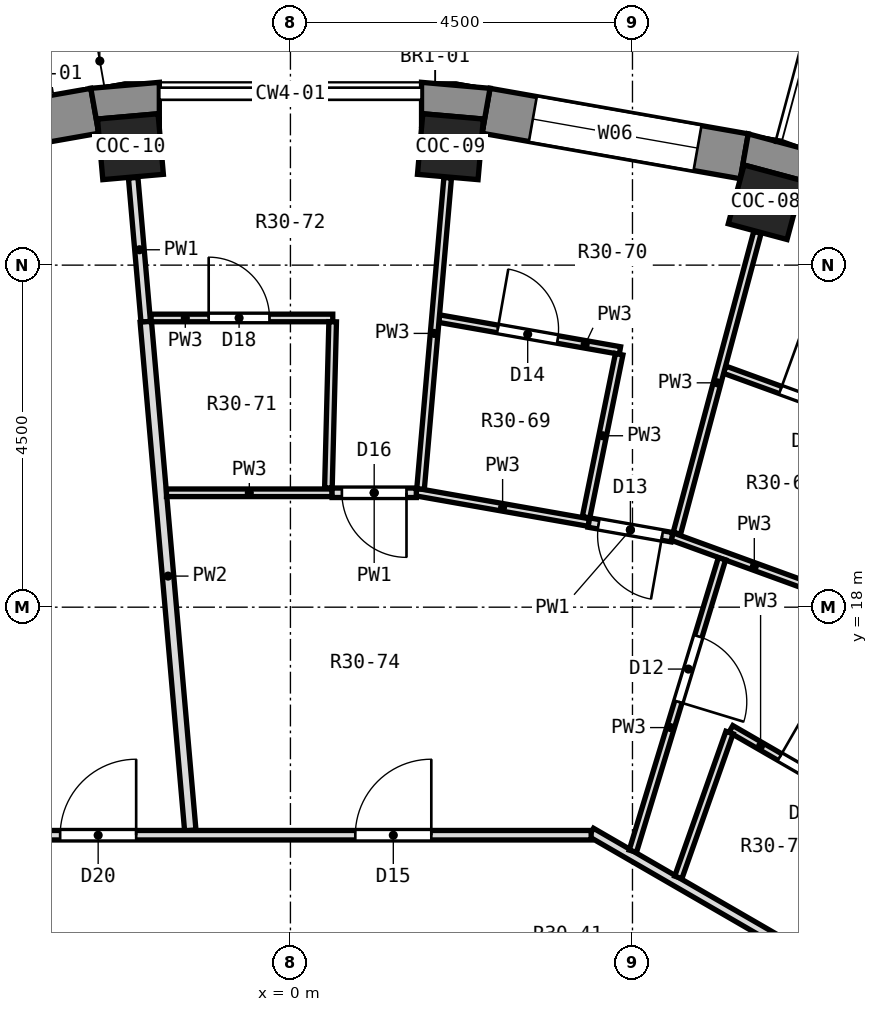
"""IFC4 building model, lengths in metres.
Left out: names, types, materials, properties, quantities, classifications, styles, units other than length and angle.
Written with IfcOpenShell. Run it as: python <this file> out.ifc"""

import sys

from ifc_helpers import new_model, si_unit, direction, frame, frame_2d, origin, origin_2d, place, context, subcontext, project, spatial, polyline, rectangle, outline, extrude, element, fill, save


model = new_model("IFC4")
c1 = context("Model", 3, precision=1e-05, world=origin(), true_north=direction((0.0, 1.0)))
c2 = subcontext(c1, "Body", "Model", "MODEL_VIEW")
j1 = project(units=[si_unit("LENGTHUNIT", "METRE"), si_unit("PLANEANGLEUNIT", "RADIAN")], contexts=[c1])
p1 = place(None, origin())
s1 = spatial("IfcSite", under=j1, at=p1, CompositionType="ELEMENT")
p2 = place(p1, origin())
s2 = spatial("IfcBuilding", under=s1, at=p2, CompositionType="ELEMENT")
p3 = place(p2, frame((0.0, 0.0, 210.3)))
s3 = spatial("IfcBuildingStorey", under=s2, at=p3, CompositionType="ELEMENT", Elevation=210.3)
for number, where, z_axis, x_axis in (
    (1, (6.25, 23.327, 0.0), (0.0, 0.0, 1.0), (0.259, 0.966, 0.0)),
    (2, (2.105, 24.058, 0.0), (0.0, 0.0, 1.0), (0.087, 0.996, 0.0)),
    (3, (-2.105, 24.058, 0.0), (0.0, 0.0, 1.0), (-0.087, 0.996, 0.0)),
):
    element("IfcColumn", number, at=place(p3, frame(where, z_axis=z_axis, x_axis=x_axis)), inside=s3, PredefinedType="COLUMN", context=c2, shape_type="SweptSolid", body=[
        extrude(rectangle(XDim=0.8, YDim=0.8, at=origin_2d()), origin(), (0.0, 0.0, 1.0), 3.3),
    ])
p4 = place(p3, frame((10.036, 22.531, 0.0), z_axis=(0.0, 0.0, 1.0), x_axis=(-0.93968799822, 0.342032843455, 0.0)))
e4 = element("IfcWall", 4, at=p4, inside=s3, PredefinedType="SOLIDWALL", context=c2, shape_type="SweptSolid", body=[
    extrude(rectangle(XDim=3.45, YDim=0.6, at=frame_2d((1.725, 0.0))), origin(), (0.0, 0.0, 1.0), 2.85),
])
p5 = place(p4, frame((0.625, 0.0, 0.9)))
e5 = element("IfcOpeningElement", 5, at=p5, cuts=e4, PredefinedType="OPENING", context=c2, shape_type="SweptSolid", body=[
    extrude(rectangle(XDim=2.2, YDim=1.8, at=frame_2d((1.1, 0.9))), frame((0.0, 0.312, 0.0), z_axis=(0.0, -1.0, 0.0), x_axis=(1.0, 0.0, 0.0)), (0.0, 0.0, 1.0), 0.624),
])
p6 = place(p3, frame((5.971, 23.932, 0.0), z_axis=(0.0, 0.0, 1.0), x_axis=(-0.984814892183, 0.173607684551, 0.0)))
e6 = element("IfcWall", 6, at=p6, inside=s3, PredefinedType="SOLIDWALL", context=c2, shape_type="SweptSolid", body=[
    extrude(rectangle(XDim=3.45, YDim=0.6, at=frame_2d((1.725, 0.0))), origin(), (0.0, 0.0, 1.0), 2.85),
])
p7 = place(p6, frame((0.625, 0.0, 0.9)))
e7 = element("IfcOpeningElement", 7, at=p7, cuts=e6, PredefinedType="OPENING", context=c2, shape_type="SweptSolid", body=[
    extrude(rectangle(XDim=2.2, YDim=1.8, at=frame_2d((1.1, 0.9))), frame((0.0, 0.312, 0.0), z_axis=(0.0, -1.0, 0.0), x_axis=(1.0, 0.0, 0.0)), (0.0, 0.0, 1.0), 0.624),
])
p8 = place(p3, frame((-2.574, 24.531, 0.0), z_axis=(0.0, 0.0, 1.0), x_axis=(-0.984814892183, -0.173607684551, 0.0)))
e8 = element("IfcWall", 8, at=p8, inside=s3, PredefinedType="SOLIDWALL", context=c2, shape_type="SweptSolid", body=[
    extrude(rectangle(XDim=3.45, YDim=0.6, at=frame_2d((1.725, 0.0))), origin(), (0.0, 0.0, 1.0), 2.85),
])
p9 = place(p8, frame((0.925, 0.0, 0.0)))
e9 = element("IfcOpeningElement", 9, at=p9, cuts=e8, PredefinedType="OPENING", context=c2, shape_type="SweptSolid", body=[
    extrude(rectangle(XDim=1.6, YDim=2.4, at=frame_2d((0.8, 1.2))), frame((0.0, 0.312, 0.0), z_axis=(0.0, -1.0, 0.0), x_axis=(1.0, 0.0, 0.0)), (0.0, 0.0, 1.0), 0.624),
])
p10 = place(p3, origin())
e10 = element("IfcWall", 10, at=p10, inside=s3, PredefinedType="SOLIDWALL", context=c2, shape_type="SweptSolid", body=[
    extrude(outline(polyline([(6.023, 24.227), (5.919, 23.636), (5.968, 23.817), (6.74, 23.61), (6.692, 23.429), (6.897, 23.993), (6.023, 24.227)])), origin(), (0.0, 0.0, 1.0), 2.85),
])
p11 = place(p3, origin())
e11 = element("IfcWall", 11, at=p11, inside=s3, PredefinedType="SOLIDWALL", context=c2, shape_type="SweptSolid", body=[
    extrude(outline(polyline([(2.626, 24.826), (1.725, 24.905), (1.725, 24.305), (1.741, 24.491), (2.538, 24.422), (2.522, 24.235), (2.626, 24.826)])), origin(), (0.0, 0.0, 1.0), 2.85),
])
p12 = place(p3, origin())
e12 = element("IfcWall", 12, at=p12, inside=s3, PredefinedType="SOLIDWALL", context=c2, shape_type="SweptSolid", body=[
    extrude(outline(polyline([(-1.725, 24.905), (-2.626, 24.826), (-2.522, 24.235), (-2.538, 24.422), (-1.741, 24.491), (-1.725, 24.305), (-1.725, 24.905)])), origin(), (0.0, 0.0, 1.0), 2.85),
])
p13 = place(p3, origin())
e13 = element("IfcWall", 13, at=p13, inside=s3, PredefinedType="PARAPET", context=c2, shape_type="SweptSolid", body=[
    extrude(outline(polyline([(-2.376, 27.155), (-7.055, 26.33), (-11.52, 24.705), (-11.265, 24.159), (-6.899, 25.748), (-2.323, 26.555), (-2.376, 27.155)])), origin(), (0.0, 0.0, 1.0), 0.5),
])
p14 = place(p3, frame((-2.069, 23.65, 0.0), z_axis=(0.0, 0.0, 1.0), x_axis=(0.086912141591, -0.99621598042, 0.0)))
e14 = element("IfcWall", 14, at=p14, inside=s3, PredefinedType="PARTITIONING", context=c2, shape_type="SweptSolid", body=[
    extrude(rectangle(XDim=1.902, YDim=0.125, at=frame_2d((0.951, 0.0))), origin(), (0.0, 0.0, 1.0), 2.85),
])
p15 = place(p3, frame((-1.903, 21.755, 0.0), z_axis=(0.0, 0.0, 1.0), x_axis=(0.087173711796, -0.99619312584, 0.0)))
e15 = element("IfcWall", 15, at=p15, inside=s3, PredefinedType="PARTITIONING", context=c2, shape_type="SweptSolid", body=[
    extrude(rectangle(XDim=6.719, YDim=0.15, at=frame_2d((3.359, 0.0))), origin(), (0.0, 0.0, 1.0), 2.85),
])
p16 = place(p3, frame((3.957, 15.037, 0.0), z_axis=(0.0, 0.0, 1.0), x_axis=(0.865555702761, -0.500812664994, 0.0)))
e16 = element("IfcWall", 16, at=p16, inside=s3, PredefinedType="PARTITIONING", context=c2, shape_type="SweptSolid", body=[
    extrude(rectangle(XDim=8.049, YDim=0.125, at=frame_2d((4.024, 0.0))), origin(), (0.0, 0.0, 1.0), 2.85),
])
p17 = place(p3, frame((5.796, 16.399, 0.0), z_axis=(0.0, 0.0, 1.0), x_axis=(0.866084140742, -0.499898250802, 0.0)))
e17 = element("IfcWall", 17, at=p17, inside=s3, PredefinedType="PARTITIONING", context=c2, shape_type="SweptSolid", body=[
    extrude(rectangle(XDim=2.284, YDim=0.1, at=frame_2d((1.142, 0.0))), origin(), (0.0, 0.0, 1.0), 2.85),
])
p18 = place(p17, frame((0.741, 0.0, 0.0)))
e18 = element("IfcOpeningElement", 18, at=p18, cuts=e17, PredefinedType="OPENING", context=c2, shape_type="SweptSolid", body=[
    extrude(rectangle(XDim=0.8, YDim=2.1, at=frame_2d((0.4, 1.05))), frame((0.0, 0.062, 0.0), z_axis=(0.0, -1.0, 0.0), x_axis=(1.0, 0.0, 0.0)), (0.0, 0.0, 1.0), 0.124),
])
p19 = place(p3, frame((5.02, 18.929, 0.0), z_axis=(0.0, 0.0, 1.0), x_axis=(0.939651079277, -0.342134256123, 0.0)))
e19 = element("IfcWall", 19, at=p19, inside=s3, PredefinedType="PARTITIONING", context=c2, shape_type="SweptSolid", body=[
    extrude(rectangle(XDim=2.305, YDim=0.1, at=frame_2d((1.152, 0.0))), origin(), (0.0, 0.0, 1.0), 2.85),
])
p20 = place(p3, frame((5.712, 21.125, 0.0), z_axis=(0.0, 0.0, 1.0), x_axis=(0.939692991858, -0.342019123812, 0.0)))
e20 = element("IfcWall", 20, at=p20, inside=s3, PredefinedType="PARTITIONING", context=c2, shape_type="SweptSolid", body=[
    extrude(rectangle(XDim=2.414, YDim=0.1, at=frame_2d((1.207, 0.0))), origin(), (0.0, 0.0, 1.0), 2.85),
])
p21 = place(p20, frame((0.782, 0.0, 0.0)))
e21 = element("IfcOpeningElement", 21, at=p21, cuts=e20, PredefinedType="OPENING", context=c2, shape_type="SweptSolid", body=[
    extrude(rectangle(XDim=0.8, YDim=2.1, at=frame_2d((0.4, 1.05))), frame((0.0, 0.062, 0.0), z_axis=(0.0, -1.0, 0.0), x_axis=(1.0, 0.0, 0.0)), (0.0, 0.0, 1.0), 0.124),
])
p22 = place(p3, frame((1.656, 19.514, 0.0), z_axis=(0.0, 0.0, 1.0), x_axis=(0.984783558818, -0.173785333909, 0.0)))
e22 = element("IfcWall", 22, at=p22, inside=s3, PredefinedType="PARTITIONING", context=c2, shape_type="SweptSolid", body=[
    extrude(rectangle(XDim=2.305, YDim=0.1, at=frame_2d((1.153, 0.0))), origin(), (0.0, 0.0, 1.0), 2.85),
])
p23 = place(p3, frame((3.926, 19.113, 0.0), z_axis=(0.0, 0.0, 1.0), x_axis=(0.984810132848, -0.173634680406, 0.0)))
e23 = element("IfcWall", 23, at=p23, inside=s3, PredefinedType="PARTITIONING", context=c2, shape_type="SweptSolid", body=[
    extrude(rectangle(XDim=1.109, YDim=0.125, at=frame_2d((0.555, 0.0))), origin(), (0.0, 0.0, 1.0), 2.85),
])
p24 = place(p23, frame((0.13, 0.0, 0.0)))
e24 = element("IfcOpeningElement", 24, at=p24, cuts=e23, PredefinedType="OPENING", context=c2, shape_type="SweptSolid", body=[
    extrude(rectangle(XDim=0.85, YDim=2.1, at=frame_2d((0.425, 1.05))), frame((0.0, 0.074, 0.0), z_axis=(0.0, -1.0, 0.0), x_axis=(1.0, 0.0, 0.0)), (0.0, 0.0, 1.0), 0.149),
])
p25 = place(p3, frame((1.957, 21.796, 0.0), z_axis=(0.0, 0.0, 1.0), x_axis=(0.984794754479, -0.173721879884, 0.0)))
e25 = element("IfcWall", 25, at=p25, inside=s3, PredefinedType="PARTITIONING", context=c2, shape_type="SweptSolid", body=[
    extrude(rectangle(XDim=2.414, YDim=0.1, at=frame_2d((1.207, 0.0))), origin(), (0.0, 0.0, 1.0), 2.85),
])
p26 = place(p25, frame((0.782, 0.0, 0.0)))
e26 = element("IfcOpeningElement", 26, at=p26, cuts=e25, PredefinedType="OPENING", context=c2, shape_type="SweptSolid", body=[
    extrude(rectangle(XDim=0.8, YDim=2.1, at=frame_2d((0.4, 1.05))), frame((0.0, 0.062, 0.0), z_axis=(0.0, -1.0, 0.0), x_axis=(1.0, 0.0, 0.0)), (0.0, 0.0, 1.0), 0.124),
])
p27 = place(p3, frame((-4.091, 15.0, 0.0), z_axis=(0.0, 0.0, 1.0), x_axis=(1.0, 0.0, 0.0)))
e27 = element("IfcWall", 27, at=p27, inside=s3, PredefinedType="PARTITIONING", context=c2, shape_type="SweptSolid", body=[
    extrude(rectangle(XDim=8.048, YDim=0.125, at=frame_2d((4.024, 0.0))), origin(), (0.0, 0.0, 1.0), 2.85),
])
p28 = place(p27, frame((4.945, 0.0, 0.0)))
e28 = element("IfcOpeningElement", 28, at=p28, cuts=e27, PredefinedType="OPENING", context=c2, shape_type="SweptSolid", body=[
    extrude(rectangle(XDim=1.0, YDim=2.1, at=frame_2d((0.5, 1.05))), frame((0.0, 0.074, 0.0), z_axis=(0.0, -1.0, 0.0), x_axis=(1.0, 0.0, 0.0)), (0.0, 0.0, 1.0), 0.149),
])
p29 = place(p27, frame((1.062, 0.0, 0.0)))
e29 = element("IfcOpeningElement", 29, at=p29, cuts=e27, PredefinedType="OPENING", context=c2, shape_type="SweptSolid", body=[
    extrude(rectangle(XDim=1.0, YDim=2.1, at=frame_2d((0.5, 1.05))), frame((0.0, 0.074, 0.0), z_axis=(0.0, -1.0, 0.0), x_axis=(1.0, 0.0, 0.0)), (0.0, 0.0, 1.0), 0.149),
])
p30 = place(p3, frame((-1.631, 19.505, 0.0), z_axis=(0.0, 0.0, 1.0), x_axis=(1.0, 0.0, 0.0)))
e30 = element("IfcWall", 30, at=p30, inside=s3, PredefinedType="PARTITIONING", context=c2, shape_type="SweptSolid", body=[
    extrude(rectangle(XDim=2.179, YDim=0.1, at=frame_2d((1.09, 0.0))), origin(), (0.0, 0.0, 1.0), 2.85),
])
p31 = place(p3, frame((0.548, 19.505, 0.0), z_axis=(0.0, 0.0, 1.0), x_axis=(1.0, 0.0, 0.0)))
e31 = element("IfcWall", 31, at=p31, inside=s3, PredefinedType="PARTITIONING", context=c2, shape_type="SweptSolid", body=[
    extrude(rectangle(XDim=1.108, YDim=0.125, at=frame_2d((0.554, 0.0))), origin(), (0.0, 0.0, 1.0), 2.85),
])
p32 = place(p31, frame((0.129, 0.0, 0.0)))
e32 = element("IfcOpeningElement", 32, at=p32, cuts=e31, PredefinedType="OPENING", context=c2, shape_type="SweptSolid", body=[
    extrude(rectangle(XDim=0.85, YDim=2.1, at=frame_2d((0.425, 1.05))), frame((0.0, 0.074, 0.0), z_axis=(0.0, -1.0, 0.0), x_axis=(1.0, 0.0, 0.0)), (0.0, 0.0, 1.0), 0.149),
])
p33 = place(p3, frame((-1.833, 21.805, 0.0), z_axis=(0.0, 0.0, 1.0), x_axis=(1.0, 0.0, 0.0)))
e33 = element("IfcWall", 33, at=p33, inside=s3, PredefinedType="PARTITIONING", context=c2, shape_type="SweptSolid", body=[
    extrude(rectangle(XDim=2.39, YDim=0.1, at=frame_2d((1.195, 0.0))), origin(), (0.0, 0.0, 1.0), 2.85),
])
p34 = place(p33, frame((0.758, 0.0, 0.0)))
e34 = element("IfcOpeningElement", 34, at=p34, cuts=e33, PredefinedType="OPENING", context=c2, shape_type="SweptSolid", body=[
    extrude(rectangle(XDim=0.8, YDim=2.1, at=frame_2d((0.4, 1.05))), frame((0.0, 0.062, 0.0), z_axis=(0.0, -1.0, 0.0), x_axis=(1.0, 0.0, 0.0)), (0.0, 0.0, 1.0), 0.124),
])
p35 = place(p3, frame((5.103, 14.445, 0.0), z_axis=(0.0, 0.0, 1.0), x_axis=(0.333281339962, 0.942827422402, 0.0)))
e35 = element("IfcWall", 35, at=p35, inside=s3, PredefinedType="PARTITIONING", context=c2, shape_type="SweptSolid", body=[
    extrude(rectangle(XDim=2.021, YDim=0.1, at=frame_2d((1.01, 0.0))), origin(), (0.0, 0.0, 1.0), 2.85),
])
p36 = place(p3, frame((4.505, 14.79, 0.0), z_axis=(0.0, 0.0, 1.0), x_axis=(0.291610860107, 0.956537038628, 0.0)))
e36 = element("IfcWall", 36, at=p36, inside=s3, PredefinedType="PARTITIONING", context=c2, shape_type="SweptSolid", body=[
    extrude(rectangle(XDim=4.022, YDim=0.1, at=frame_2d((2.011, 0.0))), origin(), (0.0, 0.0, 1.0), 2.85),
])
p37 = place(p36, frame((2.055, 0.0, 0.0)))
e37 = element("IfcOpeningElement", 37, at=p37, cuts=e36, PredefinedType="OPENING", context=c2, shape_type="SweptSolid", body=[
    extrude(rectangle(XDim=0.9, YDim=2.1, at=frame_2d((0.45, 1.05))), frame((0.0, 0.062, 0.0), z_axis=(0.0, -1.0, 0.0), x_axis=(1.0, 0.0, 0.0)), (0.0, 0.0, 1.0), 0.124),
])
p38 = place(p3, frame((5.084, 18.972, 0.0), z_axis=(0.0, 0.0, 1.0), x_axis=(0.258608038295, 0.965982340692, 0.0)))
e38 = element("IfcWall", 38, at=p38, inside=s3, PredefinedType="PARTITIONING", context=c2, shape_type="SweptSolid", body=[
    extrude(rectangle(XDim=4.098, YDim=0.1, at=frame_2d((2.049, 0.0))), origin(), (0.0, 0.0, 1.0), 2.85),
])
p39 = place(p3, frame((3.889, 19.183, 0.0), z_axis=(0.0, 0.0, 1.0), x_axis=(0.199033137994, 0.979992760167, 0.0)))
e39 = element("IfcWall", 39, at=p39, inside=s3, PredefinedType="PARTITIONING", context=c2, shape_type="SweptSolid", body=[
    extrude(rectangle(XDim=2.188, YDim=0.1, at=frame_2d((1.094, 0.0))), origin(), (0.0, 0.0, 1.0), 2.85),
])
p40 = place(p3, frame((1.712, 19.555, 0.0), z_axis=(0.0, 0.0, 1.0), x_axis=(0.086893599578, 0.996217597893, 0.0)))
e40 = element("IfcWall", 40, at=p40, inside=s3, PredefinedType="PARTITIONING", context=c2, shape_type="SweptSolid", body=[
    extrude(rectangle(XDim=4.111, YDim=0.1, at=frame_2d((2.055, 0.0))), origin(), (0.0, 0.0, 1.0), 2.85),
])
p41 = place(p3, frame((0.5, 19.567, 0.0), z_axis=(0.0, 0.0, 1.0), x_axis=(0.025658328011, 0.999670770906, 0.0)))
e41 = element("IfcWall", 41, at=p41, inside=s3, PredefinedType="PARTITIONING", context=c2, shape_type="SweptSolid", body=[
    extrude(rectangle(XDim=2.188, YDim=0.1, at=frame_2d((1.094, 0.0))), origin(), (0.0, 0.0, 1.0), 2.85),
])
p42 = place(p7, origin())
e42 = element("IfcWindow", 42, at=p42, inside=s3, PartitioningType="SINGLE_PANEL", PredefinedType="WINDOW", context=c2, shape_type="SweptSolid", body=[
    extrude(rectangle(XDim=2.2, YDim=1.8, at=frame_2d((1.1, 0.9))), frame((0.0, 0.18, 0.0), z_axis=(0.0, -1.0, 0.0), x_axis=(1.0, 0.0, 0.0)), (0.0, 0.0, 1.0), 0.06),
])
fill(e7, e42)
p43 = place(p18, origin())
e43 = element("IfcDoor", 43, at=p43, inside=s3, OperationType="SINGLE_SWING_LEFT", PredefinedType="DOOR", context=c2, shape_type="SweptSolid", body=[
    extrude(rectangle(XDim=0.8, YDim=2.1, at=frame_2d((0.4, 1.05))), frame((0.0, 0.025, 0.0), z_axis=(0.0, -1.0, 0.0), x_axis=(1.0, 0.0, 0.0)), (0.0, 0.0, 1.0), 0.05),
])
fill(e18, e43)
p44 = place(p21, origin())
e44 = element("IfcDoor", 44, at=p44, inside=s3, OperationType="SINGLE_SWING_LEFT", PredefinedType="DOOR", context=c2, shape_type="SweptSolid", body=[
    extrude(rectangle(XDim=0.8, YDim=2.1, at=frame_2d((0.4, 1.05))), frame((0.0, 0.025, 0.0), z_axis=(0.0, -1.0, 0.0), x_axis=(1.0, 0.0, 0.0)), (0.0, 0.0, 1.0), 0.05),
])
fill(e21, e44)
p45 = place(p37, frame((0.9, 0.0, 0.0), z_axis=(0.0, 0.0, 1.0), x_axis=(-1.0, 0.0, 0.0)))
e45 = element("IfcDoor", 45, at=p45, inside=s3, OperationType="SINGLE_SWING_RIGHT", PredefinedType="DOOR", context=c2, shape_type="SweptSolid", body=[
    extrude(rectangle(XDim=0.9, YDim=2.1, at=frame_2d((0.45, 1.05))), frame((0.0, 0.025, 0.0), z_axis=(0.0, -1.0, 0.0), x_axis=(1.0, 0.0, 0.0)), (0.0, 0.0, 1.0), 0.05),
])
fill(e37, e45)
p46 = place(p24, frame((0.85, 0.0, 0.0), z_axis=(0.0, 0.0, 1.0), x_axis=(-1.0, 0.0, 0.0)))
e46 = element("IfcDoor", 46, at=p46, inside=s3, OperationType="SINGLE_SWING_LEFT", PredefinedType="DOOR", context=c2, shape_type="SweptSolid", body=[
    extrude(rectangle(XDim=0.85, YDim=2.1, at=frame_2d((0.425, 1.05))), frame((0.0, 0.025, 0.0), z_axis=(0.0, -1.0, 0.0), x_axis=(1.0, 0.0, 0.0)), (0.0, 0.0, 1.0), 0.05),
])
fill(e24, e46)
p47 = place(p26, origin())
e47 = element("IfcDoor", 47, at=p47, inside=s3, OperationType="SINGLE_SWING_LEFT", PredefinedType="DOOR", context=c2, shape_type="SweptSolid", body=[
    extrude(rectangle(XDim=0.8, YDim=2.1, at=frame_2d((0.4, 1.05))), frame((0.0, 0.025, 0.0), z_axis=(0.0, -1.0, 0.0), x_axis=(1.0, 0.0, 0.0)), (0.0, 0.0, 1.0), 0.05),
])
fill(e26, e47)
p48 = place(p28, origin())
e48 = element("IfcDoor", 48, at=p48, inside=s3, OperationType="SINGLE_SWING_RIGHT", PredefinedType="DOOR", context=c2, shape_type="SweptSolid", body=[
    extrude(rectangle(XDim=1.0, YDim=2.1, at=frame_2d((0.5, 1.05))), frame((0.0, 0.025, 0.0), z_axis=(0.0, -1.0, 0.0), x_axis=(1.0, 0.0, 0.0)), (0.0, 0.0, 1.0), 0.05),
])
fill(e28, e48)
p49 = place(p32, frame((0.85, 0.0, 0.0), z_axis=(0.0, 0.0, 1.0), x_axis=(-1.0, 0.0, 0.0)))
e49 = element("IfcDoor", 49, at=p49, inside=s3, OperationType="SINGLE_SWING_LEFT", PredefinedType="DOOR", context=c2, shape_type="SweptSolid", body=[
    extrude(rectangle(XDim=0.85, YDim=2.1, at=frame_2d((0.425, 1.05))), frame((0.0, 0.025, 0.0), z_axis=(0.0, -1.0, 0.0), x_axis=(1.0, 0.0, 0.0)), (0.0, 0.0, 1.0), 0.05),
])
fill(e32, e49)
p50 = place(p34, origin())
e50 = element("IfcDoor", 50, at=p50, inside=s3, OperationType="SINGLE_SWING_LEFT", PredefinedType="DOOR", context=c2, shape_type="SweptSolid", body=[
    extrude(rectangle(XDim=0.8, YDim=2.1, at=frame_2d((0.4, 1.05))), frame((0.0, 0.025, 0.0), z_axis=(0.0, -1.0, 0.0), x_axis=(1.0, 0.0, 0.0)), (0.0, 0.0, 1.0), 0.05),
])
fill(e34, e50)
p51 = place(p29, origin())
e51 = element("IfcDoor", 51, at=p51, inside=s3, OperationType="SINGLE_SWING_RIGHT", PredefinedType="DOOR", context=c2, shape_type="SweptSolid", body=[
    extrude(rectangle(XDim=1.0, YDim=2.1, at=frame_2d((0.5, 1.05))), frame((0.0, 0.025, 0.0), z_axis=(0.0, -1.0, 0.0), x_axis=(1.0, 0.0, 0.0)), (0.0, 0.0, 1.0), 0.05),
])
fill(e29, e51)
save(model, sys.argv[1])
